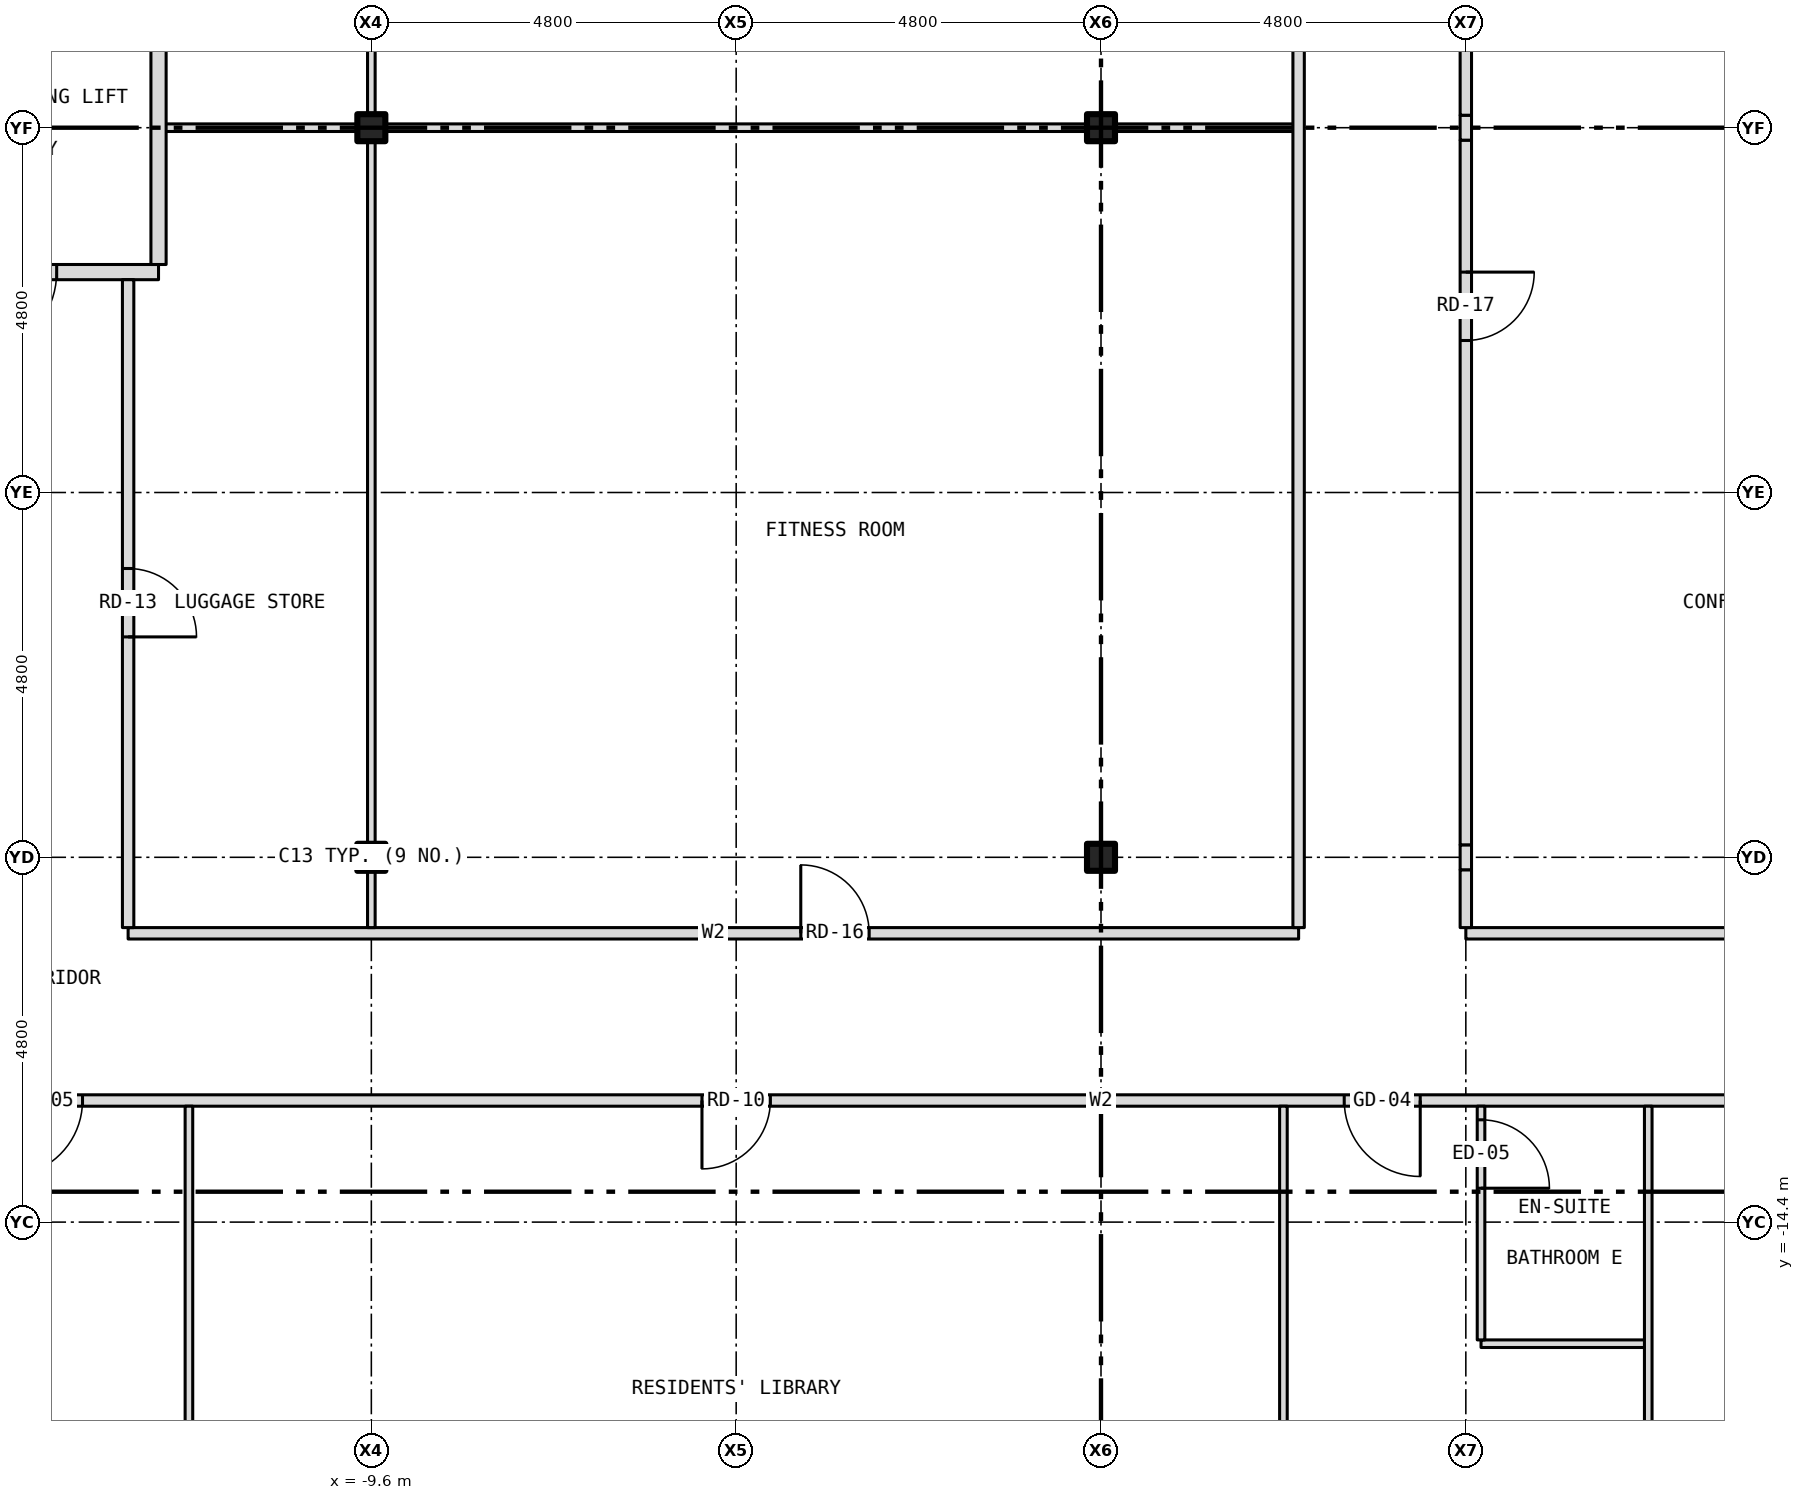
"""IFC4 building model, lengths in metres.
Left out: names, types, materials, properties, quantities, classifications, styles, units other than length and angle.
Written with IfcOpenShell. Run it as: python <this file> out.ifc"""

import sys

from ifc_helpers import new_model, si_unit, direction, frame, frame_2d, origin, origin_2d, place, context, subcontext, project, spatial, rectangle, i_section, extrude, element, fill, save


model = new_model("IFC4")
c1 = context("Model", 3, precision=1e-05, world=origin(), true_north=direction((0.0, 1.0)))
c2 = subcontext(c1, "Body", "Model", "MODEL_VIEW")
j1 = project(units=[si_unit("LENGTHUNIT", "METRE"), si_unit("PLANEANGLEUNIT", "RADIAN")], contexts=[c1])
p1 = place(None, origin())
s1 = spatial("IfcSite", under=j1, at=p1, CompositionType="ELEMENT")
p2 = place(p1, origin())
s2 = spatial("IfcBuilding", under=s1, at=p2, CompositionType="ELEMENT")
p3 = place(p2, frame((0.0, 0.0, 251.5)))
s3 = spatial("IfcBuildingStorey", under=s2, at=p3, CompositionType="ELEMENT", Elevation=251.5)
for number, where, z_axis, x_axis in (
    (1, (-9.6, -9.6, -0.15), (0.0, 0.0, 1.0), (1.0, 0.0, 0.0)),
    (2, (-9.6, 0.0, -0.15), (0.0, 0.0, 1.0), (1.0, 0.0, 0.0)),
    (3, (0.0, -9.6, -0.15), (0.0, 0.0, 1.0), (1.0, 0.0, 0.0)),
    (4, (0.0, 0.0, -0.15), (0.0, 0.0, 1.0), (1.0, 0.0, 0.0)),
):
    element("IfcColumn", number, at=place(p3, frame(where, z_axis=z_axis, x_axis=x_axis)), inside=s3, PredefinedType="COLUMN", context=c2, shape_type="SweptSolid", body=[
        extrude(i_section(OverallWidth=0.368, OverallDepth=0.356, WebThickness=0.011, FlangeThickness=0.018, at=origin_2d()), origin(), (0.0, 0.0, 1.0), 3.5),
    ])
p4 = place(p3, frame((5.0, -16.0, 0.0), z_axis=(0.0, 0.0, 1.0), x_axis=(1.0, 0.0, 0.0)))
e5 = element("IfcWall", 5, at=p4, inside=s3, PredefinedType="PARTITIONING", context=c2, shape_type="SweptSolid", body=[
    extrude(rectangle(XDim=2.2, YDim=0.1, at=frame_2d((1.1, 0.0))), origin(), (0.0, 0.0, 1.0), 3.35),
])
p5 = place(p3, frame((-15.8, -12.8, 0.0), z_axis=(0.0, 0.0, 1.0), x_axis=(1.0, 0.0, 0.0)))
e6 = element("IfcWall", 6, at=p5, inside=s3, PredefinedType="PARTITIONING", context=c2, shape_type="SweptSolid", body=[
    extrude(rectangle(XDim=31.6, YDim=0.15, at=frame_2d((15.8, 0.0))), origin(), (0.0, 0.0, 1.0), 3.35),
])
p6 = place(p5, frame((10.55, 0.0, 0.0)))
e7 = element("IfcOpeningElement", 7, at=p6, cuts=e6, PredefinedType="OPENING", context=c2, shape_type="SweptSolid", body=[
    extrude(rectangle(XDim=0.9, YDim=2.1, at=frame_2d((0.45, 1.05))), frame((0.0, 0.087, 0.0), z_axis=(0.0, -1.0, 0.0), x_axis=(1.0, 0.0, 0.0)), (0.0, 0.0, 1.0), 0.174),
])
p7 = place(p5, frame((19.0, 0.0, 0.0)))
e8 = element("IfcOpeningElement", 8, at=p7, cuts=e6, PredefinedType="OPENING", context=c2, shape_type="SweptSolid", body=[
    extrude(rectangle(XDim=1.0, YDim=2.1, at=frame_2d((0.5, 1.05))), frame((0.0, 0.087, 0.0), z_axis=(0.0, -1.0, 0.0), x_axis=(1.0, 0.0, 0.0)), (0.0, 0.0, 1.0), 0.174),
])
p8 = place(p5, frame((24.95, 0.0, 0.0)))
e9 = element("IfcOpeningElement", 9, at=p8, cuts=e6, PredefinedType="OPENING", context=c2, shape_type="SweptSolid", body=[
    extrude(rectangle(XDim=0.9, YDim=2.1, at=frame_2d((0.45, 1.05))), frame((0.0, 0.087, 0.0), z_axis=(0.0, -1.0, 0.0), x_axis=(1.0, 0.0, 0.0)), (0.0, 0.0, 1.0), 0.174),
])
p9 = place(p5, frame((1.4, 0.0, 0.0)))
e10 = element("IfcOpeningElement", 10, at=p9, cuts=e6, PredefinedType="OPENING", context=c2, shape_type="SweptSolid", body=[
    extrude(rectangle(XDim=1.0, YDim=2.1, at=frame_2d((0.5, 1.05))), frame((0.0, 0.087, 0.0), z_axis=(0.0, -1.0, 0.0), x_axis=(1.0, 0.0, 0.0)), (0.0, 0.0, 1.0), 0.174),
])
p10 = place(p5, frame((29.2, 0.0, 0.0)))
e11 = element("IfcOpeningElement", 11, at=p10, cuts=e6, PredefinedType="OPENING", context=c2, shape_type="SweptSolid", body=[
    extrude(rectangle(XDim=1.0, YDim=2.1, at=frame_2d((0.5, 1.05))), frame((0.0, 0.087, 0.0), z_axis=(0.0, -1.0, 0.0), x_axis=(1.0, 0.0, 0.0)), (0.0, 0.0, 1.0), 0.174),
])
p11 = place(p3, frame((-12.8, -10.6, 0.0), z_axis=(0.0, 0.0, 1.0), x_axis=(1.0, 0.0, 0.0)))
e12 = element("IfcWall", 12, at=p11, inside=s3, PredefinedType="PARTITIONING", context=c2, shape_type="SweptSolid", body=[
    extrude(rectangle(XDim=15.4, YDim=0.15, at=frame_2d((7.7, 0.0))), origin(), (0.0, 0.0, 1.0), 3.35),
])
p12 = place(p11, frame((8.85, 0.0, 0.0)))
e13 = element("IfcOpeningElement", 13, at=p12, cuts=e12, PredefinedType="OPENING", context=c2, shape_type="SweptSolid", body=[
    extrude(rectangle(XDim=0.9, YDim=2.1, at=frame_2d((0.45, 1.05))), frame((0.0, 0.087, 0.0), z_axis=(0.0, -1.0, 0.0), x_axis=(1.0, 0.0, 0.0)), (0.0, 0.0, 1.0), 0.174),
])
p13 = place(p3, frame((4.8, -10.6, 0.0), z_axis=(0.0, 0.0, 1.0), x_axis=(1.0, 0.0, 0.0)))
e14 = element("IfcWall", 14, at=p13, inside=s3, PredefinedType="PARTITIONING", context=c2, shape_type="SweptSolid", body=[
    extrude(rectangle(XDim=8.0, YDim=0.15, at=frame_2d((4.0, 0.0))), origin(), (0.0, 0.0, 1.0), 3.35),
])
p14 = place(p3, frame((-15.68, -1.9, 0.0), z_axis=(0.0, 0.0, 1.0), x_axis=(1.0, 0.0, 0.0)))
e15 = element("IfcWall", 15, at=p14, inside=s3, PredefinedType="PARTITIONING", context=c2, shape_type="SweptSolid", body=[
    extrude(rectangle(XDim=3.28, YDim=0.2, at=frame_2d((1.64, 0.0))), origin(), (0.0, 0.0, 1.0), 3.35),
])
p15 = place(p14, frame((0.84, 0.0, 0.0)))
e16 = element("IfcOpeningElement", 16, at=p15, cuts=e15, PredefinedType="OPENING", context=c2, shape_type="SweptSolid", body=[
    extrude(rectangle(XDim=1.1, YDim=2.1, at=frame_2d((0.55, 1.05))), frame((0.0, 0.112, 0.0), z_axis=(0.0, -1.0, 0.0), x_axis=(1.0, 0.0, 0.0)), (0.0, 0.0, 1.0), 0.224),
])
p16 = place(p3, frame((-12.4, 0.0, 0.0), z_axis=(0.0, 0.0, 1.0), x_axis=(1.0, 0.0, 0.0)))
e17 = element("IfcWall", 17, at=p16, inside=s3, PredefinedType="PARTITIONING", context=c2, shape_type="SweptSolid", body=[
    extrude(rectangle(XDim=2.616, YDim=0.1, at=frame_2d((1.308, 0.0))), origin(), (0.0, 0.0, 1.0), 2.728),
])
p17 = place(p3, frame((-9.784, 0.0, 0.0), z_axis=(0.0, 0.0, 1.0), x_axis=(1.0, 0.0, 0.0)))
e18 = element("IfcWall", 18, at=p17, inside=s3, PredefinedType="PARTITIONING", context=c2, shape_type="SweptSolid", body=[
    extrude(rectangle(XDim=0.368, YDim=0.1, at=frame_2d((0.184, 0.0))), origin(), (0.0, 0.0, 1.0), 3.35),
])
p18 = place(p3, frame((-9.416, 0.0, 0.0), z_axis=(0.0, 0.0, 1.0), x_axis=(1.0, 0.0, 0.0)))
e19 = element("IfcWall", 19, at=p18, inside=s3, PredefinedType="PARTITIONING", context=c2, shape_type="SweptSolid", body=[
    extrude(rectangle(XDim=9.232, YDim=0.1, at=frame_2d((4.616, 0.0))), origin(), (0.0, 0.0, 1.0), 2.728),
])
p19 = place(p3, frame((-0.184, 0.0, 0.0), z_axis=(0.0, 0.0, 1.0), x_axis=(1.0, 0.0, 0.0)))
e20 = element("IfcWall", 20, at=p19, inside=s3, PredefinedType="PARTITIONING", context=c2, shape_type="SweptSolid", body=[
    extrude(rectangle(XDim=0.368, YDim=0.1, at=frame_2d((0.184, 0.0))), origin(), (0.0, 0.0, 1.0), 3.35),
])
p20 = place(p3, frame((0.184, 0.0, 0.0), z_axis=(0.0, 0.0, 1.0), x_axis=(1.0, 0.0, 0.0)))
e21 = element("IfcWall", 21, at=p20, inside=s3, PredefinedType="PARTITIONING", context=c2, shape_type="SweptSolid", body=[
    extrude(rectangle(XDim=2.416, YDim=0.1, at=frame_2d((1.208, 0.0))), origin(), (0.0, 0.0, 1.0), 2.728),
])
p21 = place(p3, frame((-12.8, -10.525, 0.0), z_axis=(0.0, 0.0, 1.0), x_axis=(0.0, 1.0, 0.0)))
e22 = element("IfcWall", 22, at=p21, inside=s3, PredefinedType="PARTITIONING", context=c2, shape_type="SweptSolid", body=[
    extrude(rectangle(XDim=8.525, YDim=0.15, at=frame_2d((4.262, 0.0))), origin(), (0.0, 0.0, 1.0), 3.35),
])
p22 = place(p21, frame((3.825, 0.0, 0.0)))
e23 = element("IfcOpeningElement", 23, at=p22, cuts=e22, PredefinedType="OPENING", context=c2, shape_type="SweptSolid", body=[
    extrude(rectangle(XDim=0.9, YDim=2.1, at=frame_2d((0.45, 1.05))), frame((0.0, 0.087, 0.0), z_axis=(0.0, -1.0, 0.0), x_axis=(1.0, 0.0, 0.0)), (0.0, 0.0, 1.0), 0.174),
])
p23 = place(p3, frame((-12.4, -1.8, 0.0), z_axis=(0.0, 0.0, 1.0), x_axis=(0.0, 1.0, 0.0)))
e24 = element("IfcWall", 24, at=p23, inside=s3, PredefinedType="PARTITIONING", context=c2, shape_type="SweptSolid", body=[
    extrude(rectangle(XDim=4.0, YDim=0.2, at=frame_2d((2.0, 0.0))), origin(), (0.0, 0.0, 1.0), 3.35),
])
p24 = place(p3, frame((-12.0, -20.73, 0.0), z_axis=(0.0, 0.0, 1.0), x_axis=(0.0, 1.0, 0.0)))
e25 = element("IfcWall", 25, at=p24, inside=s3, PredefinedType="PARTITIONING", context=c2, shape_type="SweptSolid", body=[
    extrude(rectangle(XDim=7.855, YDim=0.1, at=frame_2d((3.927, 0.0))), origin(), (0.0, 0.0, 1.0), 3.35),
])
p25 = place(p3, frame((-9.6, -10.525, 0.0), z_axis=(0.0, 0.0, 1.0), x_axis=(0.0, 1.0, 0.0)))
e26 = element("IfcWall", 26, at=p25, inside=s3, PredefinedType="PARTITIONING", context=c2, shape_type="SweptSolid", body=[
    extrude(rectangle(XDim=0.741, YDim=0.1, at=frame_2d((0.371, 0.0))), origin(), (0.0, 0.0, 1.0), 2.728),
])
p26 = place(p3, frame((-9.6, -9.784, 0.0), z_axis=(0.0, 0.0, 1.0), x_axis=(0.0, 1.0, 0.0)))
e27 = element("IfcWall", 27, at=p26, inside=s3, PredefinedType="PARTITIONING", context=c2, shape_type="SweptSolid", body=[
    extrude(rectangle(XDim=0.368, YDim=0.1, at=frame_2d((0.184, 0.0))), origin(), (0.0, 0.0, 1.0), 3.35),
])
p27 = place(p3, frame((-9.6, -9.416, 0.0), z_axis=(0.0, 0.0, 1.0), x_axis=(0.0, 1.0, 0.0)))
e28 = element("IfcWall", 28, at=p27, inside=s3, PredefinedType="PARTITIONING", context=c2, shape_type="SweptSolid", body=[
    extrude(rectangle(XDim=9.366, YDim=0.1, at=frame_2d((4.683, 0.0))), origin(), (0.0, 0.0, 1.0), 2.728),
])
p28 = place(p3, frame((-9.6, 0.05, 0.0), z_axis=(0.0, 0.0, 1.0), x_axis=(0.0, 1.0, 0.0)))
e29 = element("IfcWall", 29, at=p28, inside=s3, PredefinedType="PARTITIONING", context=c2, shape_type="SweptSolid", body=[
    extrude(rectangle(XDim=5.775, YDim=0.1, at=frame_2d((2.887, 0.0))), origin(), (0.0, 0.0, 1.0), 2.728),
])
p29 = place(p3, frame((2.4, -20.73, 0.0), z_axis=(0.0, 0.0, 1.0), x_axis=(0.0, 1.0, 0.0)))
e30 = element("IfcWall", 30, at=p29, inside=s3, PredefinedType="PARTITIONING", context=c2, shape_type="SweptSolid", body=[
    extrude(rectangle(XDim=7.855, YDim=0.1, at=frame_2d((3.927, 0.0))), origin(), (0.0, 0.0, 1.0), 3.35),
])
p30 = place(p3, frame((2.6, -10.525, 0.0), z_axis=(0.0, 0.0, 1.0), x_axis=(0.0, 1.0, 0.0)))
e31 = element("IfcWall", 31, at=p30, inside=s3, PredefinedType="PARTITIONING", context=c2, shape_type="SweptSolid", body=[
    extrude(rectangle(XDim=16.35, YDim=0.15, at=frame_2d((8.175, 0.0))), origin(), (0.0, 0.0, 1.0), 3.35),
])
p31 = place(p3, frame((4.8, -10.525, 0.0), z_axis=(0.0, 0.0, 1.0), x_axis=(0.0, 1.0, 0.0)))
e32 = element("IfcWall", 32, at=p31, inside=s3, PredefinedType="PARTITIONING", context=c2, shape_type="SweptSolid", body=[
    extrude(rectangle(XDim=0.761, YDim=0.15, at=frame_2d((0.38, 0.0))), origin(), (0.0, 0.0, 1.0), 2.817),
])
p32 = place(p3, frame((4.8, -9.764, 0.0), z_axis=(0.0, 0.0, 1.0), x_axis=(0.0, 1.0, 0.0)))
e33 = element("IfcWall", 33, at=p32, inside=s3, PredefinedType="PARTITIONING", context=c2, shape_type="SweptSolid", body=[
    extrude(rectangle(XDim=0.328, YDim=0.15, at=frame_2d((0.164, 0.0))), origin(), (0.0, 0.0, 1.0), 3.35),
])
p33 = place(p3, frame((4.8, -9.436, 0.0), z_axis=(0.0, 0.0, 1.0), x_axis=(0.0, 1.0, 0.0)))
e34 = element("IfcWall", 34, at=p33, inside=s3, PredefinedType="PARTITIONING", context=c2, shape_type="SweptSolid", body=[
    extrude(rectangle(XDim=9.272, YDim=0.15, at=frame_2d((4.636, 0.0))), origin(), (0.0, 0.0, 1.0), 2.817),
])
p34 = place(p33, frame((6.636, 0.0, 0.0)))
e35 = element("IfcOpeningElement", 35, at=p34, cuts=e34, PredefinedType="OPENING", context=c2, shape_type="SweptSolid", body=[
    extrude(rectangle(XDim=0.9, YDim=2.1, at=frame_2d((0.45, 1.05))), frame((0.0, 0.087, 0.0), z_axis=(0.0, -1.0, 0.0), x_axis=(1.0, 0.0, 0.0)), (0.0, 0.0, 1.0), 0.174),
])
p35 = place(p3, frame((4.8, -0.164, 0.0), z_axis=(0.0, 0.0, 1.0), x_axis=(0.0, 1.0, 0.0)))
e36 = element("IfcWall", 36, at=p35, inside=s3, PredefinedType="PARTITIONING", context=c2, shape_type="SweptSolid", body=[
    extrude(rectangle(XDim=0.328, YDim=0.15, at=frame_2d((0.164, 0.0))), origin(), (0.0, 0.0, 1.0), 3.35),
])
p36 = place(p3, frame((4.8, 0.164, 0.0), z_axis=(0.0, 0.0, 1.0), x_axis=(0.0, 1.0, 0.0)))
e37 = element("IfcWall", 37, at=p36, inside=s3, PredefinedType="PARTITIONING", context=c2, shape_type="SweptSolid", body=[
    extrude(rectangle(XDim=5.661, YDim=0.15, at=frame_2d((2.831, 0.0))), origin(), (0.0, 0.0, 1.0), 2.817),
])
p37 = place(p3, frame((5.0, -15.95, 0.0), z_axis=(0.0, 0.0, 1.0), x_axis=(0.0, 1.0, 0.0)))
e38 = element("IfcWall", 38, at=p37, inside=s3, PredefinedType="PARTITIONING", context=c2, shape_type="SweptSolid", body=[
    extrude(rectangle(XDim=3.075, YDim=0.1, at=frame_2d((1.538, 0.0))), origin(), (0.0, 0.0, 1.0), 3.35),
])
p38 = place(p37, frame((1.996, 0.0, 0.0)))
e39 = element("IfcOpeningElement", 39, at=p38, cuts=e38, PredefinedType="OPENING", context=c2, shape_type="SweptSolid", body=[
    extrude(rectangle(XDim=0.9, YDim=2.1, at=frame_2d((0.45, 1.05))), frame((0.0, 0.062, 0.0), z_axis=(0.0, -1.0, 0.0), x_axis=(1.0, 0.0, 0.0)), (0.0, 0.0, 1.0), 0.124),
])
p39 = place(p3, frame((7.2, -20.73, 0.0), z_axis=(0.0, 0.0, 1.0), x_axis=(0.0, 1.0, 0.0)))
e40 = element("IfcWall", 40, at=p39, inside=s3, PredefinedType="PARTITIONING", context=c2, shape_type="SweptSolid", body=[
    extrude(rectangle(XDim=7.855, YDim=0.1, at=frame_2d((3.927, 0.0))), origin(), (0.0, 0.0, 1.0), 3.35),
])
p40 = place(p15, origin())
e41 = element("IfcDoor", 41, at=p40, inside=s3, OperationType="SINGLE_SWING_LEFT", PredefinedType="DOOR", context=c2, shape_type="SweptSolid", body=[
    extrude(rectangle(XDim=1.1, YDim=2.1, at=frame_2d((0.55, 1.05))), frame((0.0, 0.025, 0.0), z_axis=(0.0, -1.0, 0.0), x_axis=(1.0, 0.0, 0.0)), (0.0, 0.0, 1.0), 0.05),
])
fill(e16, e41)
p41 = place(p6, origin())
e42 = element("IfcDoor", 42, at=p41, inside=s3, OperationType="SINGLE_SWING_LEFT", PredefinedType="DOOR", context=c2, shape_type="SweptSolid", body=[
    extrude(rectangle(XDim=0.9, YDim=2.1, at=frame_2d((0.45, 1.05))), frame((0.0, 0.025, 0.0), z_axis=(0.0, -1.0, 0.0), x_axis=(1.0, 0.0, 0.0)), (0.0, 0.0, 1.0), 0.05),
])
fill(e7, e42)
p42 = place(p7, origin())
e43 = element("IfcDoor", 43, at=p42, inside=s3, OperationType="SINGLE_SWING_RIGHT", PredefinedType="DOOR", context=c2, shape_type="SweptSolid", body=[
    extrude(rectangle(XDim=1.0, YDim=2.1, at=frame_2d((0.5, 1.05))), frame((0.0, 0.025, 0.0), z_axis=(0.0, -1.0, 0.0), x_axis=(1.0, 0.0, 0.0)), (0.0, 0.0, 1.0), 0.05),
])
fill(e8, e43)
p43 = place(p38, origin())
e44 = element("IfcDoor", 44, at=p43, inside=s3, OperationType="SINGLE_SWING_LEFT", PredefinedType="DOOR", context=c2, shape_type="SweptSolid", body=[
    extrude(rectangle(XDim=0.9, YDim=2.1, at=frame_2d((0.45, 1.05))), frame((0.0, 0.025, 0.0), z_axis=(0.0, -1.0, 0.0), x_axis=(1.0, 0.0, 0.0)), (0.0, 0.0, 1.0), 0.05),
])
fill(e39, e44)
p44 = place(p9, origin())
e45 = element("IfcDoor", 45, at=p44, inside=s3, OperationType="SINGLE_SWING_LEFT", PredefinedType="DOOR", context=c2, shape_type="SweptSolid", body=[
    extrude(rectangle(XDim=1.0, YDim=2.1, at=frame_2d((0.5, 1.05))), frame((0.0, 0.025, 0.0), z_axis=(0.0, -1.0, 0.0), x_axis=(1.0, 0.0, 0.0)), (0.0, 0.0, 1.0), 0.05),
])
fill(e10, e45)
p45 = place(p22, origin())
e46 = element("IfcDoor", 46, at=p45, inside=s3, OperationType="SINGLE_SWING_LEFT", PredefinedType="DOOR", context=c2, shape_type="SweptSolid", body=[
    extrude(rectangle(XDim=0.9, YDim=2.1, at=frame_2d((0.45, 1.05))), frame((0.0, 0.025, 0.0), z_axis=(0.0, -1.0, 0.0), x_axis=(1.0, 0.0, 0.0)), (0.0, 0.0, 1.0), 0.05),
])
fill(e23, e46)
p46 = place(p12, origin())
e47 = element("IfcDoor", 47, at=p46, inside=s3, OperationType="SINGLE_SWING_LEFT", PredefinedType="DOOR", context=c2, shape_type="SweptSolid", body=[
    extrude(rectangle(XDim=0.9, YDim=2.1, at=frame_2d((0.45, 1.05))), frame((0.0, 0.025, 0.0), z_axis=(0.0, -1.0, 0.0), x_axis=(1.0, 0.0, 0.0)), (0.0, 0.0, 1.0), 0.05),
])
fill(e13, e47)
p47 = place(p34, origin())
e48 = element("IfcDoor", 48, at=p47, inside=s3, OperationType="SINGLE_SWING_RIGHT", PredefinedType="DOOR", context=c2, shape_type="SweptSolid", body=[
    extrude(rectangle(XDim=0.9, YDim=2.1, at=frame_2d((0.45, 1.05))), frame((0.0, 0.025, 0.0), z_axis=(0.0, -1.0, 0.0), x_axis=(1.0, 0.0, 0.0)), (0.0, 0.0, 1.0), 0.05),
])
fill(e35, e48)
save(model, sys.argv[1])
